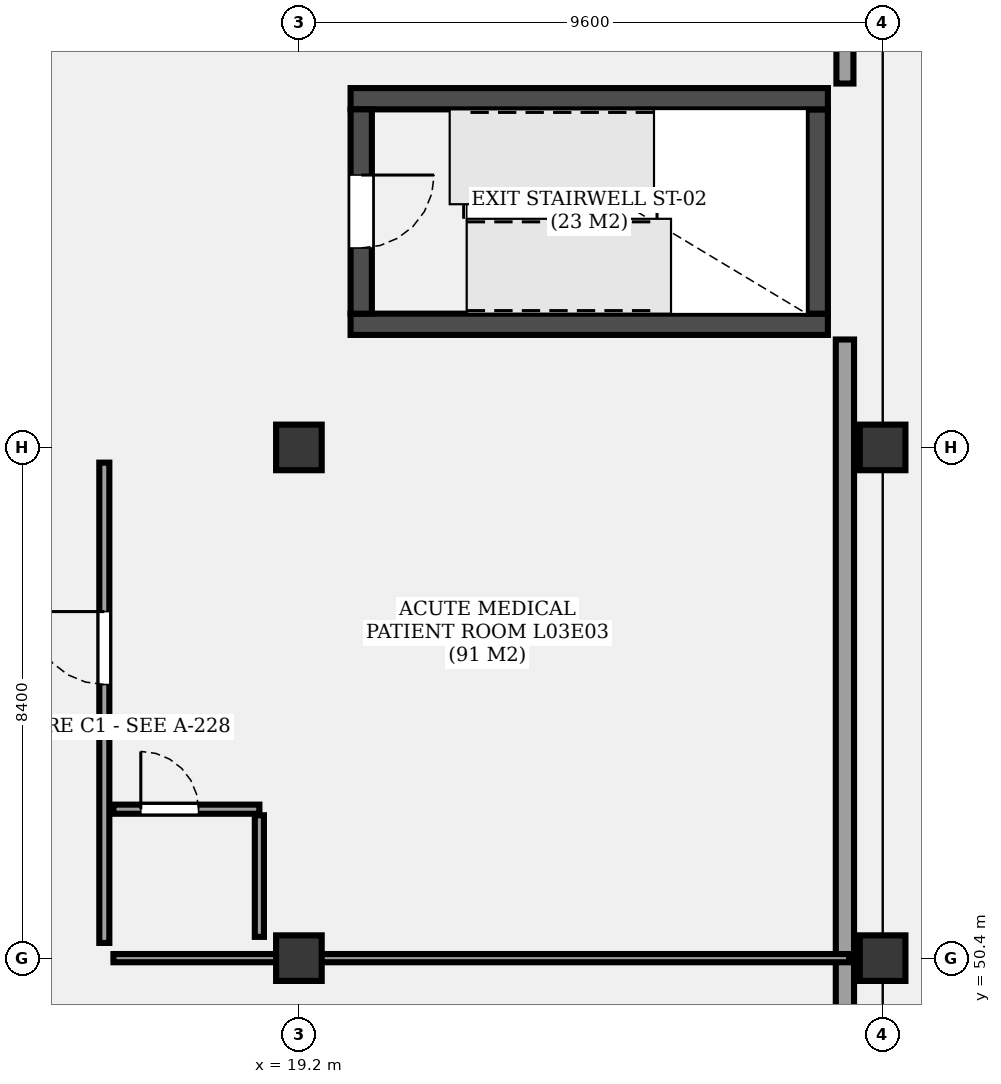
"""IFC4 building model, lengths in metres.
Left out: names, types, materials, properties, quantities, classifications, styles, units other than length and angle.
Written with IfcOpenShell. Run it as: python <this file> out.ifc"""

import sys

from ifc_helpers import new_model, si_unit, direction, frame, frame_2d, origin, origin_2d, place, context, subcontext, project, spatial, rectangle, extrude, element, fill, save


model = new_model("IFC4")
c1 = context("Model", 3, precision=1e-05, world=origin(), true_north=direction((0.0, 1.0)))
c2 = subcontext(c1, "Body", "Model", "MODEL_VIEW")
j1 = project(units=[si_unit("LENGTHUNIT", "METRE"), si_unit("PLANEANGLEUNIT", "RADIAN")], contexts=[c1])
p1 = place(None, origin())
s1 = spatial("IfcSite", under=j1, at=p1, CompositionType="ELEMENT")
p2 = place(p1, origin())
s2 = spatial("IfcBuilding", under=s1, at=p2, CompositionType="ELEMENT")
p3 = place(p2, frame((0.0, 0.0, 13.5)))
s3 = spatial("IfcBuildingStorey", under=s2, at=p3, CompositionType="ELEMENT", Elevation=13.5)
for number, where, z_axis, x_axis in (
    (1, (19.2, 50.4, 0.0), (0.0, 0.0, 1.0), (1.0, 0.0, 0.0)),
    (2, (19.2, 58.8, 0.0), (0.0, 0.0, 1.0), (1.0, 0.0, 0.0)),
    (3, (28.8, 50.4, 0.0), (0.0, 0.0, 1.0), (1.0, 0.0, 0.0)),
    (4, (28.8, 58.8, 0.0), (0.0, 0.0, 1.0), (1.0, 0.0, 0.0)),
):
    element("IfcColumn", number, at=place(p3, frame(where, z_axis=z_axis, x_axis=x_axis)), inside=s3, PredefinedType="COLUMN", context=c2, shape_type="SweptSolid", body=[
        extrude(rectangle(XDim=0.75, YDim=0.75, at=origin_2d()), origin(), (0.0, 0.0, 1.0), 4.3),
    ])
p4 = place(p3, frame((20.05, 60.825, 0.0), z_axis=(0.0, 0.0, 1.0), x_axis=(1.0, 0.0, 0.0)))
e5 = element("IfcWall", 5, at=p4, inside=s3, PredefinedType="SHEAR", context=c2, shape_type="SweptSolid", body=[
    extrude(rectangle(XDim=7.85, YDim=0.35, at=frame_2d((3.925, 0.0))), origin(), (0.0, 0.0, 1.0), 4.3),
])
p5 = place(p3, frame((27.725, 61.0, 0.0), z_axis=(0.0, 0.0, 1.0), x_axis=(0.0, 1.0, 0.0)))
e6 = element("IfcWall", 6, at=p5, inside=s3, PredefinedType="SHEAR", context=c2, shape_type="SweptSolid", body=[
    extrude(rectangle(XDim=3.36, YDim=0.35, at=frame_2d((1.68, 0.0))), origin(), (0.0, 0.0, 1.0), 4.3),
])
p6 = place(p3, frame((27.9, 64.535, 0.0), z_axis=(0.0, 0.0, 1.0), x_axis=(-1.0, 0.0, 0.0)))
e7 = element("IfcWall", 7, at=p6, inside=s3, PredefinedType="SHEAR", context=c2, shape_type="SweptSolid", body=[
    extrude(rectangle(XDim=7.85, YDim=0.35, at=frame_2d((3.925, 0.0))), origin(), (0.0, 0.0, 1.0), 4.3),
])
p7 = place(p3, frame((20.225, 64.36, 0.0), z_axis=(0.0, 0.0, 1.0), x_axis=(0.0, -1.0, 0.0)))
e8 = element("IfcWall", 8, at=p7, inside=s3, PredefinedType="SHEAR", context=c2, shape_type="SweptSolid", body=[
    extrude(rectangle(XDim=3.36, YDim=0.35, at=frame_2d((1.68, 0.0))), origin(), (0.0, 0.0, 1.0), 4.3),
])
p8 = place(p7, frame((1.08, 0.0, 0.0)))
e9 = element("IfcOpeningElement", 9, at=p8, cuts=e8, PredefinedType="OPENING", context=c2, shape_type="SweptSolid", body=[
    extrude(rectangle(XDim=1.2, YDim=2.2, at=frame_2d((0.6, 1.1))), frame((0.0, 0.185, 0.0), z_axis=(0.0, -1.0, 0.0), x_axis=(1.0, 0.0, 0.0)), (0.0, 0.0, 1.0), 0.37),
])
p9 = place(p3, frame((28.18, 66.78, 0.0), z_axis=(0.0, 0.0, 1.0), x_axis=(0.0, -1.0, 0.0)))
e10 = element("IfcWall", 10, at=p9, inside=s3, PredefinedType="SOLIDWALL", context=c2, shape_type="SweptSolid", body=[
    extrude(rectangle(XDim=1.995, YDim=0.28, at=frame_2d((0.998, 0.0))), origin(), (0.0, 0.0, 1.0), 3.49),
])
p10 = place(p3, frame((28.18, 60.575, 0.0), z_axis=(0.0, 0.0, 1.0), x_axis=(0.0, -1.0, 0.0)))
e11 = element("IfcWall", 11, at=p10, inside=s3, PredefinedType="SOLIDWALL", context=c2, shape_type="SweptSolid", body=[
    extrude(rectangle(XDim=12.615, YDim=0.3, at=frame_2d((6.308, 0.0))), origin(), (0.0, 0.0, 1.0), 3.49),
])
p11 = place(p3, frame((16.0, 50.65, 0.0), z_axis=(0.0, 0.0, 1.0), x_axis=(0.0, 1.0, 0.0)))
e12 = element("IfcWall", 12, at=p11, inside=s3, PredefinedType="PARTITIONING", context=c2, shape_type="SweptSolid", body=[
    extrude(rectangle(XDim=7.9, YDim=0.165, at=frame_2d((3.95, 0.0))), origin(), (0.0, 0.0, 1.0), 3.4),
])
p12 = place(p11, frame((4.25, 0.0, 0.0)))
e13 = element("IfcOpeningElement", 13, at=p12, cuts=e12, PredefinedType="OPENING", context=c2, shape_type="SweptSolid", body=[
    extrude(rectangle(XDim=1.2, YDim=2.2, at=frame_2d((0.6, 1.1))), frame((0.0, 0.093, 0.0), z_axis=(0.0, -1.0, 0.0), x_axis=(1.0, 0.0, 0.0)), (0.0, 0.0, 1.0), 0.185),
])
p13 = place(p3, frame((16.15, 52.85, 0.0), z_axis=(0.0, 0.0, 1.0), x_axis=(1.0, 0.0, 0.0)))
e14 = element("IfcWall", 14, at=p13, inside=s3, PredefinedType="PARTITIONING", context=c2, shape_type="SweptSolid", body=[
    extrude(rectangle(XDim=2.4, YDim=0.15, at=frame_2d((1.2, 0.0))), origin(), (0.0, 0.0, 1.0), 3.4),
])
p14 = place(p13, frame((0.45, 0.0, 0.0)))
e15 = element("IfcOpeningElement", 15, at=p14, cuts=e14, PredefinedType="OPENING", context=c2, shape_type="SweptSolid", body=[
    extrude(rectangle(XDim=0.95, YDim=2.1, at=frame_2d((0.475, 1.05))), frame((0.0, 0.085, 0.0), z_axis=(0.0, -1.0, 0.0), x_axis=(1.0, 0.0, 0.0)), (0.0, 0.0, 1.0), 0.17),
])
p15 = place(p3, frame((18.55, 50.75, 0.0), z_axis=(0.0, 0.0, 1.0), x_axis=(0.0, 1.0, 0.0)))
e16 = element("IfcWall", 16, at=p15, inside=s3, PredefinedType="PARTITIONING", context=c2, shape_type="SweptSolid", body=[
    extrude(rectangle(XDim=2.0, YDim=0.15, at=frame_2d((1.0, 0.0))), origin(), (0.0, 0.0, 1.0), 3.4),
])
p16 = place(p3, frame((16.15, 50.4, 0.0), z_axis=(0.0, 0.0, 1.0), x_axis=(1.0, 0.0, 0.0)))
e17 = element("IfcWall", 17, at=p16, inside=s3, PredefinedType="PARTITIONING", context=c2, shape_type="SweptSolid", body=[
    extrude(rectangle(XDim=12.1, YDim=0.135, at=frame_2d((6.05, 0.0))), origin(), (0.0, 0.0, 1.0), 3.4),
])
p17 = place(p8, origin())
e18 = element("IfcDoor", 18, at=p17, inside=s3, OperationType="SINGLE_SWING_LEFT", PredefinedType="DOOR", context=c2, shape_type="SweptSolid", body=[
    extrude(rectangle(XDim=1.2, YDim=2.2, at=frame_2d((0.6, 1.1))), frame((0.0, 0.025, 0.0), z_axis=(0.0, -1.0, 0.0), x_axis=(1.0, 0.0, 0.0)), (0.0, 0.0, 1.0), 0.05),
])
fill(e9, e18)
p18 = place(p12, origin())
e19 = element("IfcDoor", 19, at=p18, inside=s3, OperationType="SINGLE_SWING_RIGHT", PredefinedType="DOOR", context=c2, shape_type="SweptSolid", body=[
    extrude(rectangle(XDim=1.2, YDim=2.2, at=frame_2d((0.6, 1.1))), frame((0.0, 0.025, 0.0), z_axis=(0.0, -1.0, 0.0), x_axis=(1.0, 0.0, 0.0)), (0.0, 0.0, 1.0), 0.05),
])
fill(e13, e19)
p19 = place(p14, origin())
e20 = element("IfcDoor", 20, at=p19, inside=s3, OperationType="SINGLE_SWING_LEFT", PredefinedType="DOOR", context=c2, shape_type="SweptSolid", body=[
    extrude(rectangle(XDim=0.95, YDim=2.1, at=frame_2d((0.475, 1.05))), frame((0.0, 0.025, 0.0), z_axis=(0.0, -1.0, 0.0), x_axis=(1.0, 0.0, 0.0)), (0.0, 0.0, 1.0), 0.05),
])
fill(e15, e20)
save(model, sys.argv[1])
